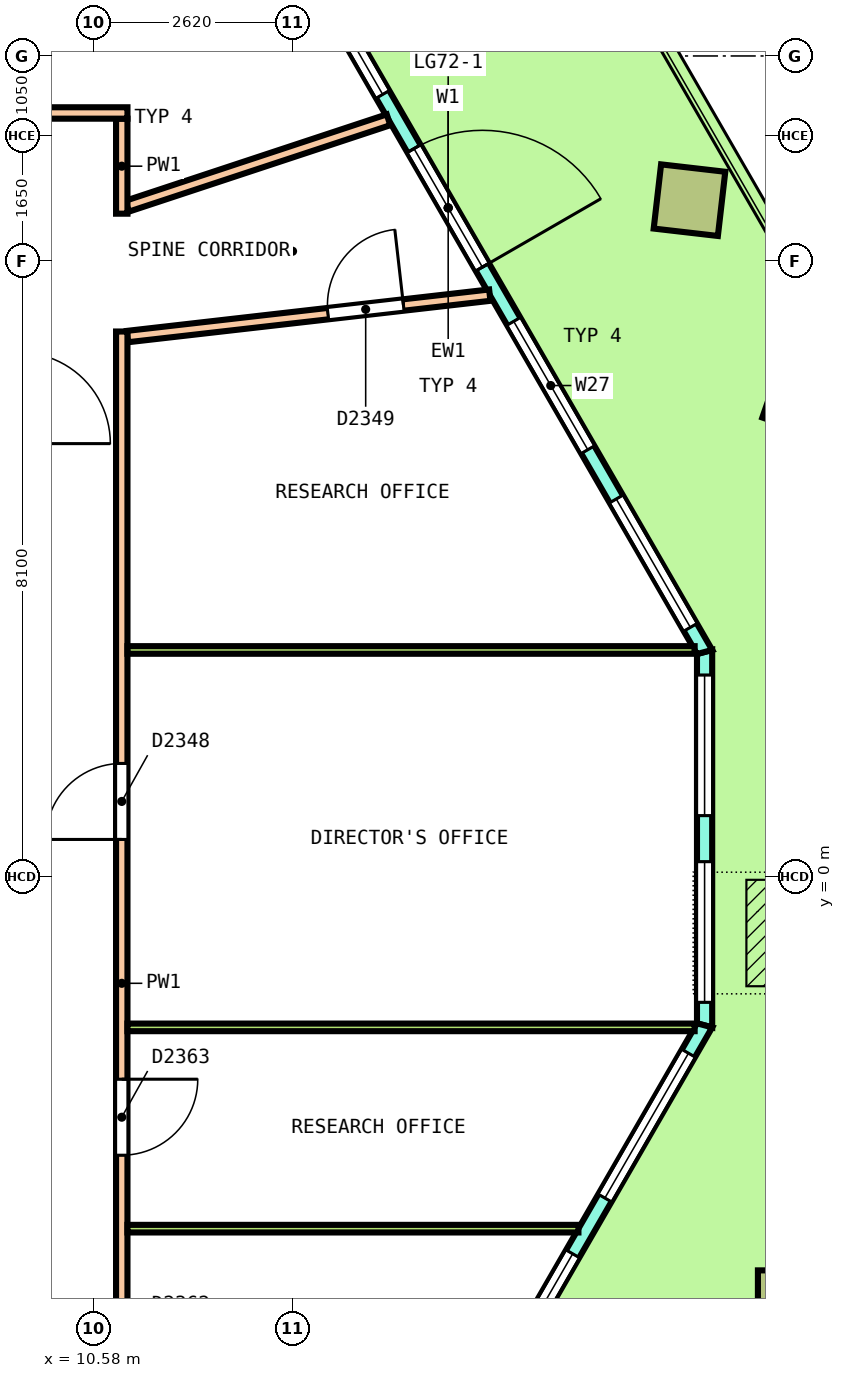
"""IFC4 building model, lengths in metres.
Left out: names, types, materials, properties, quantities, classifications, styles, units other than length and angle.
Written with IfcOpenShell. Run it as: python <this file> out.ifc"""

import sys

from ifc_helpers import new_model, si_unit, direction, frame, frame_2d, origin, origin_2d, place, context, subcontext, project, spatial, polyline, rectangle, outline, extrude, element, fill, save


model = new_model("IFC4")
c1 = context("Model", 3, precision=1e-05, world=origin(), true_north=direction((0.0, 1.0)))
c2 = subcontext(c1, "Body", "Model", "MODEL_VIEW")
j1 = project(units=[si_unit("LENGTHUNIT", "METRE"), si_unit("PLANEANGLEUNIT", "RADIAN")], contexts=[c1])
p1 = place(None, origin())
s1 = spatial("IfcSite", under=j1, at=p1, CompositionType="ELEMENT")
p2 = place(p1, origin())
s2 = spatial("IfcBuilding", under=s1, at=p2, CompositionType="ELEMENT")
p3 = place(p2, frame((0.0, 0.0, 324.6)))
s3 = spatial("IfcBuildingStorey", under=s2, at=p3, CompositionType="ELEMENT", Elevation=324.6)
p4 = place(p3, frame((19.918, 6.306, 0.0), z_axis=(0.021727128018, 0.025136615799, 0.999447888814), x_axis=(-0.500981292203, 0.865389796007, -0.010874089855)))
e1 = element("IfcColumn", 1, at=p4, inside=s3, PredefinedType="COLUMN", context=c2, shape_type="SweptSolid", body=[
    extrude(rectangle(XDim=0.85, YDim=0.85, at=origin_2d()), origin(), (0.0, 0.0, 1.0), 3.652),
])
p5 = place(p3, frame((18.419, 8.903, 0.0), z_axis=(0.025338523594, 0.018853466104, 0.999501128583), x_axis=(-0.501175757197, 0.865337954228, -0.003617370643)))
e2 = element("IfcColumn", 2, at=p5, inside=s3, PredefinedType="COLUMN", context=c2, shape_type="SweptSolid", body=[
    extrude(rectangle(XDim=0.85, YDim=0.85, at=origin_2d()), origin(), (0.0, 0.0, 1.0), 3.652),
])
p6 = place(p3, frame((19.744, -5.602, 0.0), z_axis=(0.010833570963, 0.018791564448, 0.999764727746), x_axis=(0.499616210892, 0.865975261025, -0.021690760837)))
e3 = element("IfcColumn", 3, at=p6, inside=s3, PredefinedType="COLUMN", context=c2, shape_type="SweptSolid", body=[
    extrude(rectangle(XDim=0.85, YDim=0.85, at=origin_2d()), origin(), (0.0, 0.0, 1.0), 3.651),
])
p7 = place(p3, frame((18.618, -1.953, 0.0), z_axis=(0.0, 0.0, 1.0), x_axis=(0.0, 1.0, 0.0)))
e4 = element("IfcWall", 4, at=p7, inside=s3, PredefinedType="SOLIDWALL", context=c2, shape_type="SweptSolid", body=[
    extrude(outline(polyline([(-0.027, -0.1), (1.214, -0.1), (2.456, -0.1), (3.697, -0.1), (4.938, -0.1), (4.885, 0.1), (3.67, 0.1), (2.456, 0.1), (1.241, 0.1), (0.027, 0.1), (-0.027, -0.1)])), origin(), (0.0, 0.0, 1.0), 3.7),
])
p8 = place(p7, frame((0.303, 0.0, 0.1)))
e5 = element("IfcOpeningElement", 5, at=p8, cuts=e4, PredefinedType="OPENING", context=c2, shape_type="SweptSolid", body=[
    extrude(rectangle(XDim=1.85, YDim=2.9, at=frame_2d((0.925, 1.45))), frame((0.0, 0.11, 0.0), z_axis=(0.0, -1.0, 0.0), x_axis=(1.0, 0.0, 0.0)), (0.0, 0.0, 1.0), 0.22),
])
p9 = place(p7, frame((2.759, 0.0, 0.1)))
e6 = element("IfcOpeningElement", 6, at=p9, cuts=e4, PredefinedType="OPENING", context=c2, shape_type="SweptSolid", body=[
    extrude(rectangle(XDim=1.85, YDim=2.9, at=frame_2d((0.925, 1.45))), frame((0.0, 0.11, 0.0), z_axis=(0.0, -1.0, 0.0), x_axis=(1.0, 0.0, 0.0)), (0.0, 0.0, 1.0), 0.22),
])
p10 = place(p3, frame((18.618, 2.958, 0.0), z_axis=(0.0, 0.0, 1.0), x_axis=(-0.500001755459, 0.866024390267, 0.0)))
e7 = element("IfcWall", 7, at=p10, inside=s3, PredefinedType="SOLIDWALL", context=c2, shape_type="SweptSolid", body=[
    extrude(outline(polyline([(-0.027, -0.1), (1.015, -0.1), (2.057, -0.1), (3.099, -0.1), (4.142, -0.1), (5.184, -0.1), (6.226, -0.1), (7.268, -0.1), (8.31, -0.1), (9.352, -0.1), (10.394, -0.1), (11.436, -0.1), (12.479, -0.1), (13.521, -0.1), (13.467, 0.1), (12.433, 0.1), (11.399, 0.1), (10.365, 0.1), (9.332, 0.1), (8.298, 0.1), (7.264, 0.1), (6.23, 0.1), (5.196, 0.1), (4.162, 0.1), (3.128, 0.1), (2.094, 0.1), (1.061, 0.1), (0.027, 0.1), (-0.027, -0.1)])), origin(), (0.0, 0.0, 1.0), 3.7),
])
p11 = place(p10, frame((0.374, 0.0, 0.1)))
e8 = element("IfcOpeningElement", 8, at=p11, cuts=e7, PredefinedType="OPENING", context=c2, shape_type="SweptSolid", body=[
    extrude(rectangle(XDim=1.95, YDim=2.9, at=frame_2d((0.975, 1.45))), frame((0.0, 0.11, 0.0), z_axis=(0.0, -1.0, 0.0), x_axis=(1.0, 0.0, 0.0)), (0.0, 0.0, 1.0), 0.22),
])
p12 = place(p10, frame((3.073, 0.0, 0.1)))
e9 = element("IfcOpeningElement", 9, at=p12, cuts=e7, PredefinedType="OPENING", context=c2, shape_type="SweptSolid", body=[
    extrude(rectangle(XDim=1.95, YDim=2.9, at=frame_2d((0.975, 1.45))), frame((0.0, 0.11, 0.0), z_axis=(0.0, -1.0, 0.0), x_axis=(1.0, 0.0, 0.0)), (0.0, 0.0, 1.0), 0.22),
])
p13 = place(p10, frame((5.847, 0.0, 0.0)))
e10 = element("IfcOpeningElement", 10, at=p13, cuts=e7, PredefinedType="OPENING", context=c2, shape_type="SweptSolid", body=[
    extrude(rectangle(XDim=1.8, YDim=2.4, at=frame_2d((0.9, 1.2))), frame((0.0, 0.11, 0.0), z_axis=(0.0, -1.0, 0.0), x_axis=(1.0, 0.0, 0.0)), (0.0, 0.0, 1.0), 0.22),
])
p14 = place(p10, frame((5.847, 0.0, 2.55)))
e11 = element("IfcOpeningElement", 11, at=p14, cuts=e7, PredefinedType="OPENING", context=c2, shape_type="SweptSolid", body=[
    extrude(rectangle(XDim=1.8, YDim=0.45, at=frame_2d((0.9, 0.225))), frame((0.0, 0.11, 0.0), z_axis=(0.0, -1.0, 0.0), x_axis=(1.0, 0.0, 0.0)), (0.0, 0.0, 1.0), 0.22),
])
p15 = place(p10, frame((8.47, 0.0, 0.1)))
e12 = element("IfcOpeningElement", 12, at=p15, cuts=e7, PredefinedType="OPENING", context=c2, shape_type="SweptSolid", body=[
    extrude(rectangle(XDim=1.95, YDim=2.9, at=frame_2d((0.975, 1.45))), frame((0.0, 0.11, 0.0), z_axis=(0.0, -1.0, 0.0), x_axis=(1.0, 0.0, 0.0)), (0.0, 0.0, 1.0), 0.22),
])
p16 = place(p10, frame((11.169, 0.0, 0.1)))
e13 = element("IfcOpeningElement", 13, at=p16, cuts=e7, PredefinedType="OPENING", context=c2, shape_type="SweptSolid", body=[
    extrude(rectangle(XDim=1.95, YDim=2.9, at=frame_2d((0.975, 1.45))), frame((0.0, 0.11, 0.0), z_axis=(0.0, -1.0, 0.0), x_axis=(1.0, 0.0, 0.0)), (0.0, 0.0, 1.0), 0.22),
])
p17 = place(p3, frame((11.0, -15.147, 0.0), z_axis=(0.0, 0.0, 1.0), x_axis=(0.500003117631, 0.866023603812, 0.0)))
e14 = element("IfcWall", 14, at=p17, inside=s3, PredefinedType="SOLIDWALL", context=c2, shape_type="SweptSolid", body=[
    extrude(outline(polyline([(-0.027, -0.1), (0.992, -0.1), (2.012, -0.1), (3.031, -0.1), (4.05, -0.1), (5.07, -0.1), (6.089, -0.1), (7.108, -0.1), (8.127, -0.1), (9.146, -0.1), (10.166, -0.1), (11.185, -0.1), (12.204, -0.1), (13.224, -0.1), (14.243, -0.1), (15.262, -0.1), (15.208, 0.1), (14.196, 0.1), (13.184, 0.1), (12.172, 0.1), (11.16, 0.1), (10.148, 0.1), (9.136, 0.1), (8.124, 0.1), (7.112, 0.1), (6.1, 0.1), (5.087, 0.1), (4.075, 0.1), (3.063, 0.1), (2.051, 0.1), (1.039, 0.1), (0.027, 0.1), (-0.027, -0.1)])), origin(), (0.0, 0.0, 1.0), 3.7),
])
p18 = place(p17, frame((0.424, 0.0, 0.1)))
e15 = element("IfcOpeningElement", 15, at=p18, cuts=e14, PredefinedType="OPENING", context=c2, shape_type="SweptSolid", body=[
    extrude(rectangle(XDim=2.2, YDim=2.9, at=frame_2d((1.1, 1.45))), frame((0.0, 0.11, 0.0), z_axis=(0.0, -1.0, 0.0), x_axis=(1.0, 0.0, 0.0)), (0.0, 0.0, 1.0), 0.22),
])
p19 = place(p17, frame((3.47, 0.0, 0.1)))
e16 = element("IfcOpeningElement", 16, at=p19, cuts=e14, PredefinedType="OPENING", context=c2, shape_type="SweptSolid", body=[
    extrude(rectangle(XDim=2.2, YDim=2.9, at=frame_2d((1.1, 1.45))), frame((0.0, 0.11, 0.0), z_axis=(0.0, -1.0, 0.0), x_axis=(1.0, 0.0, 0.0)), (0.0, 0.0, 1.0), 0.22),
])
p20 = place(p17, frame((6.718, 0.0, 0.0)))
e17 = element("IfcOpeningElement", 17, at=p20, cuts=e14, PredefinedType="OPENING", context=c2, shape_type="SweptSolid", body=[
    extrude(rectangle(XDim=1.8, YDim=2.4, at=frame_2d((0.9, 1.2))), frame((0.0, 0.11, 0.0), z_axis=(0.0, -1.0, 0.0), x_axis=(1.0, 0.0, 0.0)), (0.0, 0.0, 1.0), 0.22),
])
p21 = place(p17, frame((6.718, 0.0, 2.55)))
e18 = element("IfcOpeningElement", 18, at=p21, cuts=e14, PredefinedType="OPENING", context=c2, shape_type="SweptSolid", body=[
    extrude(rectangle(XDim=1.8, YDim=0.45, at=frame_2d((0.9, 0.225))), frame((0.0, 0.11, 0.0), z_axis=(0.0, -1.0, 0.0), x_axis=(1.0, 0.0, 0.0)), (0.0, 0.0, 1.0), 0.22),
])
p22 = place(p17, frame((9.565, 0.0, 0.1)))
e19 = element("IfcOpeningElement", 19, at=p22, cuts=e14, PredefinedType="OPENING", context=c2, shape_type="SweptSolid", body=[
    extrude(rectangle(XDim=2.2, YDim=2.9, at=frame_2d((1.1, 1.45))), frame((0.0, 0.11, 0.0), z_axis=(0.0, -1.0, 0.0), x_axis=(1.0, 0.0, 0.0)), (0.0, 0.0, 1.0), 0.22),
])
p23 = place(p17, frame((12.612, 0.0, 0.1)))
e20 = element("IfcOpeningElement", 20, at=p23, cuts=e14, PredefinedType="OPENING", context=c2, shape_type="SweptSolid", body=[
    extrude(rectangle(XDim=2.2, YDim=2.9, at=frame_2d((1.1, 1.45))), frame((0.0, 0.11, 0.0), z_axis=(0.0, -1.0, 0.0), x_axis=(1.0, 0.0, 0.0)), (0.0, 0.0, 1.0), 0.22),
])
p24 = place(p3, frame((11.024, 7.108, 0.0), z_axis=(0.0, 0.0, 1.0), x_axis=(0.993530704552, 0.113563810752, 0.0)))
e21 = element("IfcWall", 21, at=p24, inside=s3, PredefinedType="PARTITIONING", context=c2, shape_type="SweptSolid", body=[
    extrude(rectangle(XDim=4.798, YDim=0.15, at=frame_2d((2.399, 0.0))), origin(), (0.0, 0.0, 1.0), 3.05),
])
p25 = place(p24, frame((2.655, 0.0, 0.0)))
e22 = element("IfcOpeningElement", 22, at=p25, cuts=e21, PredefinedType="OPENING", context=c2, shape_type="SweptSolid", body=[
    extrude(rectangle(XDim=1.0, YDim=2.1, at=frame_2d((0.5, 1.05))), frame((0.0, 0.085, 0.0), z_axis=(0.0, -1.0, 0.0), x_axis=(1.0, 0.0, 0.0)), (0.0, 0.0, 1.0), 0.17),
])
p26 = place(p3, frame((11.021, 8.823, 0.0), z_axis=(0.0, 0.0, 1.0), x_axis=(0.949442310498, 0.313941553535, 0.0)))
e23 = element("IfcWall", 23, at=p26, inside=s3, PredefinedType="PARTITIONING", context=c2, shape_type="SweptSolid", body=[
    extrude(rectangle(XDim=3.622, YDim=0.15, at=frame_2d((1.811, 0.0))), origin(), (0.0, 0.0, 1.0), 3.05),
])
p27 = place(p3, frame((10.95, -9.975, 0.0), z_axis=(0.0, 0.0, 1.0), x_axis=(0.0, 1.0, 0.0)))
e24 = element("IfcWall", 24, at=p27, inside=s3, PredefinedType="PARTITIONING", context=c2, shape_type="SweptSolid", body=[
    extrude(rectangle(XDim=17.15, YDim=0.15, at=frame_2d((8.575, 0.0))), origin(), (0.0, 0.0, 1.0), 3.05),
])
p28 = place(p27, frame((10.468, 0.0, 0.0)))
e25 = element("IfcOpeningElement", 25, at=p28, cuts=e24, PredefinedType="OPENING", context=c2, shape_type="SweptSolid", body=[
    extrude(rectangle(XDim=1.0, YDim=2.1, at=frame_2d((0.5, 1.05))), frame((0.0, 0.085, 0.0), z_axis=(0.0, -1.0, 0.0), x_axis=(1.0, 0.0, 0.0)), (0.0, 0.0, 1.0), 0.17),
])
p29 = place(p27, frame((3.067, 0.0, 0.0)))
e26 = element("IfcOpeningElement", 26, at=p29, cuts=e24, PredefinedType="OPENING", context=c2, shape_type="SweptSolid", body=[
    extrude(rectangle(XDim=1.0, YDim=2.1, at=frame_2d((0.5, 1.05))), frame((0.0, 0.085, 0.0), z_axis=(0.0, -1.0, 0.0), x_axis=(1.0, 0.0, 0.0)), (0.0, 0.0, 1.0), 0.17),
])
p30 = place(p27, frame((6.313, 0.0, 0.0)))
e27 = element("IfcOpeningElement", 27, at=p30, cuts=e24, PredefinedType="OPENING", context=c2, shape_type="SweptSolid", body=[
    extrude(rectangle(XDim=1.0, YDim=2.1, at=frame_2d((0.5, 1.05))), frame((0.0, 0.085, 0.0), z_axis=(0.0, -1.0, 0.0), x_axis=(1.0, 0.0, 0.0)), (0.0, 0.0, 1.0), 0.17),
])
p31 = place(p3, frame((10.95, 8.725, 0.0), z_axis=(0.0, 0.0, 1.0), x_axis=(0.0, 1.0, 0.0)))
e28 = element("IfcWall", 28, at=p31, inside=s3, PredefinedType="PARTITIONING", context=c2, shape_type="SweptSolid", body=[
    extrude(rectangle(XDim=1.25, YDim=0.15, at=frame_2d((0.625, 0.0))), origin(), (0.0, 0.0, 1.0), 3.05),
])
p32 = place(p3, frame((-10.875, 10.05, 0.0), z_axis=(0.0, 0.0, 1.0), x_axis=(1.0, 0.0, 0.0)))
e29 = element("IfcWall", 29, at=p32, inside=s3, PredefinedType="PARTITIONING", context=c2, shape_type="SweptSolid", body=[
    extrude(rectangle(XDim=21.9, YDim=0.15, at=frame_2d((10.95, 0.0))), origin(), (0.0, 0.0, 1.0), 3.05),
])
p33 = place(p32, frame((18.713, 0.0, 0.0)))
e30 = element("IfcOpeningElement", 30, at=p33, cuts=e29, PredefinedType="OPENING", context=c2, shape_type="SweptSolid", body=[
    extrude(rectangle(XDim=1.2, YDim=2.1, at=frame_2d((0.6, 1.05))), frame((0.0, 0.085, 0.0), z_axis=(0.0, -1.0, 0.0), x_axis=(1.0, 0.0, 0.0)), (0.0, 0.0, 1.0), 0.17),
])
p34 = place(p32, frame((13.229, 0.0, 0.0)))
e31 = element("IfcOpeningElement", 31, at=p34, cuts=e29, PredefinedType="OPENING", context=c2, shape_type="SweptSolid", body=[
    extrude(rectangle(XDim=1.0, YDim=2.1, at=frame_2d((0.5, 1.05))), frame((0.0, 0.085, 0.0), z_axis=(0.0, -1.0, 0.0), x_axis=(1.0, 0.0, 0.0)), (0.0, 0.0, 1.0), 0.17),
])
p35 = place(p32, frame((10.036, 0.0, 0.0)))
e32 = element("IfcOpeningElement", 32, at=p35, cuts=e29, PredefinedType="OPENING", context=c2, shape_type="SweptSolid", body=[
    extrude(rectangle(XDim=1.0, YDim=2.1, at=frame_2d((0.5, 1.05))), frame((0.0, 0.085, 0.0), z_axis=(0.0, -1.0, 0.0), x_axis=(1.0, 0.0, 0.0)), (0.0, 0.0, 1.0), 0.17),
])
p36 = place(p32, frame((6.321, 0.0, 0.0)))
e33 = element("IfcOpeningElement", 33, at=p36, cuts=e29, PredefinedType="OPENING", context=c2, shape_type="SweptSolid", body=[
    extrude(rectangle(XDim=1.2, YDim=2.1, at=frame_2d((0.6, 1.05))), frame((0.0, 0.085, 0.0), z_axis=(0.0, -1.0, 0.0), x_axis=(1.0, 0.0, 0.0)), (0.0, 0.0, 1.0), 0.17),
])
p37 = place(p32, frame((1.588, 0.0, 0.0)))
e34 = element("IfcOpeningElement", 34, at=p37, cuts=e29, PredefinedType="OPENING", context=c2, shape_type="SweptSolid", body=[
    extrude(rectangle(XDim=1.0, YDim=2.1, at=frame_2d((0.5, 1.05))), frame((0.0, 0.085, 0.0), z_axis=(0.0, -1.0, 0.0), x_axis=(1.0, 0.0, 0.0)), (0.0, 0.0, 1.0), 0.17),
])
for number, where, z_axis, x_axis in (
    (35, (11.025, 2.985, 0.0), (0.0, 0.0, 1.0), (1.0, 0.0, 0.0)),
    (36, (11.025, -1.98, 0.0), (0.0, 0.0, 1.0), (1.0, 0.0, 0.0)),
):
    element("IfcWall", number, at=place(p3, frame(where, z_axis=z_axis, x_axis=x_axis)), inside=s3, PredefinedType="PARTITIONING", context=c2, shape_type="SweptSolid", body=[
        extrude(rectangle(XDim=7.462, YDim=0.1, at=frame_2d((3.731, 0.0))), origin(), (0.0, 0.0, 1.0), 3.05),
    ])
p38 = place(p3, frame((11.025, -4.628, 0.0), z_axis=(0.0, 0.0, 1.0), x_axis=(1.0, 0.0, 0.0)))
e37 = element("IfcWall", 37, at=p38, inside=s3, PredefinedType="PARTITIONING", context=c2, shape_type="SweptSolid", body=[
    extrude(rectangle(XDim=5.933, YDim=0.1, at=frame_2d((2.967, 0.0))), origin(), (0.0, 0.0, 1.0), 3.05),
])
p39 = place(p8, origin())
e38 = element("IfcWindow", 38, at=p39, inside=s3, PartitioningType="SINGLE_PANEL", PredefinedType="WINDOW", context=c2, shape_type="SweptSolid", body=[
    extrude(rectangle(XDim=1.85, YDim=2.9, at=frame_2d((0.925, 1.45))), frame((0.0, 0.03, 0.0), z_axis=(0.0, -1.0, 0.0), x_axis=(1.0, 0.0, 0.0)), (0.0, 0.0, 1.0), 0.06),
])
fill(e5, e38)
p40 = place(p9, origin())
e39 = element("IfcWindow", 39, at=p40, inside=s3, PartitioningType="SINGLE_PANEL", PredefinedType="WINDOW", context=c2, shape_type="SweptSolid", body=[
    extrude(rectangle(XDim=1.85, YDim=2.9, at=frame_2d((0.925, 1.45))), frame((0.0, 0.03, 0.0), z_axis=(0.0, -1.0, 0.0), x_axis=(1.0, 0.0, 0.0)), (0.0, 0.0, 1.0), 0.06),
])
fill(e6, e39)
p41 = place(p11, origin())
e40 = element("IfcWindow", 40, at=p41, inside=s3, PartitioningType="SINGLE_PANEL", PredefinedType="WINDOW", context=c2, shape_type="SweptSolid", body=[
    extrude(rectangle(XDim=1.95, YDim=2.9, at=frame_2d((0.975, 1.45))), frame((0.0, 0.03, 0.0), z_axis=(0.0, -1.0, 0.0), x_axis=(1.0, 0.0, 0.0)), (0.0, 0.0, 1.0), 0.06),
])
fill(e8, e40)
p42 = place(p12, origin())
e41 = element("IfcWindow", 41, at=p42, inside=s3, PartitioningType="SINGLE_PANEL", PredefinedType="WINDOW", context=c2, shape_type="SweptSolid", body=[
    extrude(rectangle(XDim=1.95, YDim=2.9, at=frame_2d((0.975, 1.45))), frame((0.0, 0.03, 0.0), z_axis=(0.0, -1.0, 0.0), x_axis=(1.0, 0.0, 0.0)), (0.0, 0.0, 1.0), 0.06),
])
fill(e9, e41)
p43 = place(p13, origin())
e42 = element("IfcDoor", 42, at=p43, inside=s3, OperationType="DOUBLE_DOOR_SINGLE_SWING", PredefinedType="DOOR", context=c2, shape_type="SweptSolid", body=[
    extrude(rectangle(XDim=1.8, YDim=2.4, at=frame_2d((0.9, 1.2))), frame((0.0, 0.025, 0.0), z_axis=(0.0, -1.0, 0.0), x_axis=(1.0, 0.0, 0.0)), (0.0, 0.0, 1.0), 0.05),
])
fill(e10, e42)
p44 = place(p14, origin())
e43 = element("IfcWindow", 43, at=p44, inside=s3, PartitioningType="SINGLE_PANEL", PredefinedType="WINDOW", context=c2, shape_type="SweptSolid", body=[
    extrude(rectangle(XDim=1.8, YDim=0.45, at=frame_2d((0.9, 0.225))), frame((0.0, 0.03, 0.0), z_axis=(0.0, -1.0, 0.0), x_axis=(1.0, 0.0, 0.0)), (0.0, 0.0, 1.0), 0.06),
])
fill(e11, e43)
p45 = place(p15, origin())
e44 = element("IfcWindow", 44, at=p45, inside=s3, PartitioningType="SINGLE_PANEL", PredefinedType="WINDOW", context=c2, shape_type="SweptSolid", body=[
    extrude(rectangle(XDim=1.95, YDim=2.9, at=frame_2d((0.975, 1.45))), frame((0.0, 0.03, 0.0), z_axis=(0.0, -1.0, 0.0), x_axis=(1.0, 0.0, 0.0)), (0.0, 0.0, 1.0), 0.06),
])
fill(e12, e44)
p46 = place(p22, origin())
e45 = element("IfcWindow", 45, at=p46, inside=s3, PartitioningType="SINGLE_PANEL", PredefinedType="WINDOW", context=c2, shape_type="SweptSolid", body=[
    extrude(rectangle(XDim=2.2, YDim=2.9, at=frame_2d((1.1, 1.45))), frame((0.0, 0.03, 0.0), z_axis=(0.0, -1.0, 0.0), x_axis=(1.0, 0.0, 0.0)), (0.0, 0.0, 1.0), 0.06),
])
fill(e19, e45)
p47 = place(p23, origin())
e46 = element("IfcWindow", 46, at=p47, inside=s3, PartitioningType="SINGLE_PANEL", PredefinedType="WINDOW", context=c2, shape_type="SweptSolid", body=[
    extrude(rectangle(XDim=2.2, YDim=2.9, at=frame_2d((1.1, 1.45))), frame((0.0, 0.03, 0.0), z_axis=(0.0, -1.0, 0.0), x_axis=(1.0, 0.0, 0.0)), (0.0, 0.0, 1.0), 0.06),
])
fill(e20, e46)
p48 = place(p28, origin())
e47 = element("IfcDoor", 47, at=p48, inside=s3, OperationType="SINGLE_SWING_RIGHT", PredefinedType="DOOR", context=c2, shape_type="SweptSolid", body=[
    extrude(rectangle(XDim=1.0, YDim=2.1, at=frame_2d((0.5, 1.05))), frame((0.0, 0.025, 0.0), z_axis=(0.0, -1.0, 0.0), x_axis=(1.0, 0.0, 0.0)), (0.0, 0.0, 1.0), 0.05),
])
fill(e25, e47)
p49 = place(p25, origin())
e48 = element("IfcDoor", 48, at=p49, inside=s3, OperationType="SINGLE_SWING_RIGHT", PredefinedType="DOOR", context=c2, shape_type="SweptSolid", body=[
    extrude(rectangle(XDim=1.0, YDim=2.1, at=frame_2d((0.5, 1.05))), frame((0.0, 0.025, 0.0), z_axis=(0.0, -1.0, 0.0), x_axis=(1.0, 0.0, 0.0)), (0.0, 0.0, 1.0), 0.05),
])
fill(e22, e48)
p50 = place(p30, origin())
e49 = element("IfcDoor", 49, at=p50, inside=s3, OperationType="SINGLE_SWING_LEFT", PredefinedType="DOOR", context=c2, shape_type="SweptSolid", body=[
    extrude(rectangle(XDim=1.0, YDim=2.1, at=frame_2d((0.5, 1.05))), frame((0.0, 0.025, 0.0), z_axis=(0.0, -1.0, 0.0), x_axis=(1.0, 0.0, 0.0)), (0.0, 0.0, 1.0), 0.05),
])
fill(e27, e49)
save(model, sys.argv[1])
